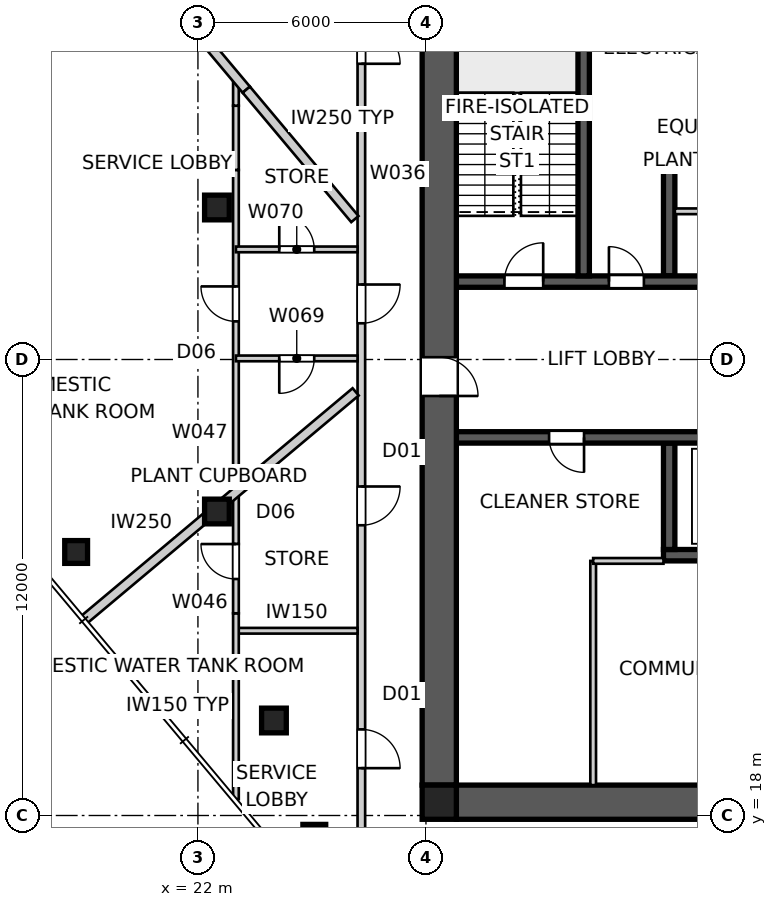
"""IFC4 building model, lengths in metres.
Left out: names, types, materials, properties, quantities, classifications, styles, units other than length and angle.
Written with IfcOpenShell. Run it as: python <this file> out.ifc"""

import sys

from ifc_helpers import new_model, si_unit, direction, frame, frame_2d, origin, origin_2d, place, context, subcontext, project, spatial, polyline, rectangle, outline, extrude, element, fill, save


model = new_model("IFC4")
c1 = context("Model", 3, precision=1e-05, world=origin(), true_north=direction((0.0, 1.0)))
c2 = subcontext(c1, "Body", "Model", "MODEL_VIEW")
j1 = project(units=[si_unit("LENGTHUNIT", "METRE"), si_unit("PLANEANGLEUNIT", "RADIAN")], contexts=[c1])
p1 = place(None, origin())
s1 = spatial("IfcSite", under=j1, at=p1, CompositionType="ELEMENT")
p2 = place(p1, origin())
s2 = spatial("IfcBuilding", under=s1, at=p2, CompositionType="ELEMENT")
p3 = place(p2, frame((0.0, 0.0, 299.8)))
s3 = spatial("IfcBuildingStorey", under=s2, at=p3, CompositionType="ELEMENT", Elevation=299.8)
p4 = place(p3, frame((51.2, 18.35, 0.0), z_axis=(0.0, 0.0, 1.0), x_axis=(-1.0, 0.0, 0.0)))
e1 = element("IfcWall", 1, at=p4, inside=s3, PredefinedType="SHEAR", context=c2, shape_type="SweptSolid", body=[
    extrude(outline(polyline([(0.0, -0.45), (22.4, -0.45), (22.4, -0.025), (22.85, -0.025), (22.85, 0.025), (22.4, 0.025), (22.4, 0.45), (0.0, 0.45), (0.0, 0.025), (-0.45, 0.025), (-0.45, -0.025), (0.0, -0.025), (0.0, -0.45)])), origin(), (0.0, 0.0, 1.0), 4.5),
])
p5 = place(p3, frame((28.35, 41.2, 0.0), z_axis=(0.0, 0.0, 1.0), x_axis=(0.0, -1.0, 0.0)))
e2 = element("IfcWall", 2, at=p5, inside=s3, PredefinedType="SHEAR", context=c2, shape_type="SweptSolid", body=[
    extrude(outline(polyline([(0.0, -0.45), (22.4, -0.45), (22.4, -0.025), (22.85, -0.025), (22.85, 0.025), (22.4, 0.025), (22.4, 0.45), (0.0, 0.45), (0.0, 0.025), (-0.45, 0.025), (-0.45, -0.025), (0.0, -0.025), (0.0, -0.45)])), origin(), (0.0, 0.0, 1.0), 4.5),
])
p6 = place(p5, frame((11.14, 0.0, 0.0)))
e3 = element("IfcOpeningElement", 3, at=p6, cuts=e2, PredefinedType="OPENING", context=c2, shape_type="SweptSolid", body=[
    extrude(rectangle(XDim=1.02, YDim=2.4, at=frame_2d((0.51, 1.2))), frame((0.0, 0.46, 0.0), z_axis=(0.0, -1.0, 0.0), x_axis=(1.0, 0.0, 0.0)), (0.0, 0.0, 1.0), 0.92),
])
p7 = place(p3, frame((28.8, 32.05, 0.0), z_axis=(0.0, 0.0, 1.0), x_axis=(1.0, 0.0, 0.0)))
e4 = element("IfcWall", 4, at=p7, inside=s3, PredefinedType="SHEAR", context=c2, shape_type="SweptSolid", body=[
    extrude(rectangle(XDim=22.4, YDim=0.3, at=frame_2d((11.2, 0.0))), origin(), (0.0, 0.0, 1.0), 4.5),
])
p8 = place(p7, frame((19.04, 0.0, 0.0)))
e5 = element("IfcOpeningElement", 5, at=p8, cuts=e4, PredefinedType="OPENING", context=c2, shape_type="SweptSolid", body=[
    extrude(rectangle(XDim=0.92, YDim=2.1, at=frame_2d((0.46, 1.05))), frame((0.0, 0.16, 0.0), z_axis=(0.0, -1.0, 0.0), x_axis=(1.0, 0.0, 0.0)), (0.0, 0.0, 1.0), 0.32),
])
p9 = place(p7, frame((1.265, 0.0, 0.0)))
e6 = element("IfcOpeningElement", 6, at=p9, cuts=e4, PredefinedType="OPENING", context=c2, shape_type="SweptSolid", body=[
    extrude(rectangle(XDim=1.02, YDim=2.1, at=frame_2d((0.51, 1.05))), frame((0.0, 0.16, 0.0), z_axis=(0.0, -1.0, 0.0), x_axis=(1.0, 0.0, 0.0)), (0.0, 0.0, 1.0), 0.32),
])
p10 = place(p7, frame((4.015, 0.0, 0.0)))
e7 = element("IfcOpeningElement", 7, at=p10, cuts=e4, PredefinedType="OPENING", context=c2, shape_type="SweptSolid", body=[
    extrude(rectangle(XDim=0.92, YDim=2.1, at=frame_2d((0.46, 1.05))), frame((0.0, 0.16, 0.0), z_axis=(0.0, -1.0, 0.0), x_axis=(1.0, 0.0, 0.0)), (0.0, 0.0, 1.0), 0.32),
])
p11 = place(p7, frame((7.015, 0.0, 0.0)))
e8 = element("IfcOpeningElement", 8, at=p11, cuts=e4, PredefinedType="OPENING", context=c2, shape_type="SweptSolid", body=[
    extrude(rectangle(XDim=0.92, YDim=2.1, at=frame_2d((0.46, 1.05))), frame((0.0, 0.16, 0.0), z_axis=(0.0, -1.0, 0.0), x_axis=(1.0, 0.0, 0.0)), (0.0, 0.0, 1.0), 0.32),
])
p12 = place(p7, frame((9.34, 0.0, 0.0)))
e9 = element("IfcOpeningElement", 9, at=p12, cuts=e4, PredefinedType="OPENING", context=c2, shape_type="SweptSolid", body=[
    extrude(rectangle(XDim=0.92, YDim=2.1, at=frame_2d((0.46, 1.05))), frame((0.0, 0.16, 0.0), z_axis=(0.0, -1.0, 0.0), x_axis=(1.0, 0.0, 0.0)), (0.0, 0.0, 1.0), 0.32),
])
p13 = place(p7, frame((14.85, 0.0, 0.0)))
e10 = element("IfcOpeningElement", 10, at=p13, cuts=e4, PredefinedType="OPENING", context=c2, shape_type="SweptSolid", body=[
    extrude(rectangle(XDim=1.1, YDim=2.1, at=frame_2d((0.55, 1.05))), frame((0.0, 0.16, 0.0), z_axis=(0.0, -1.0, 0.0), x_axis=(1.0, 0.0, 0.0)), (0.0, 0.0, 1.0), 0.32),
])
p14 = place(p3, frame((51.2, 27.95, 0.0), z_axis=(0.0, 0.0, 1.0), x_axis=(-1.0, 0.0, 0.0)))
e11 = element("IfcWall", 11, at=p14, inside=s3, PredefinedType="SHEAR", context=c2, shape_type="SweptSolid", body=[
    extrude(rectangle(XDim=22.4, YDim=0.3, at=frame_2d((11.2, 0.0))), origin(), (0.0, 0.0, 1.0), 4.5),
])
p15 = place(p14, frame((19.04, 0.0, 0.0)))
e12 = element("IfcOpeningElement", 12, at=p15, cuts=e11, PredefinedType="OPENING", context=c2, shape_type="SweptSolid", body=[
    extrude(rectangle(XDim=0.92, YDim=2.1, at=frame_2d((0.46, 1.05))), frame((0.0, 0.16, 0.0), z_axis=(0.0, -1.0, 0.0), x_axis=(1.0, 0.0, 0.0)), (0.0, 0.0, 1.0), 0.32),
])
p16 = place(p14, frame((1.265, 0.0, 0.0)))
e13 = element("IfcOpeningElement", 13, at=p16, cuts=e11, PredefinedType="OPENING", context=c2, shape_type="SweptSolid", body=[
    extrude(rectangle(XDim=1.02, YDim=2.1, at=frame_2d((0.51, 1.05))), frame((0.0, 0.16, 0.0), z_axis=(0.0, -1.0, 0.0), x_axis=(1.0, 0.0, 0.0)), (0.0, 0.0, 1.0), 0.32),
])
p17 = place(p14, frame((4.015, 0.0, 0.0)))
e14 = element("IfcOpeningElement", 14, at=p17, cuts=e11, PredefinedType="OPENING", context=c2, shape_type="SweptSolid", body=[
    extrude(rectangle(XDim=0.92, YDim=2.1, at=frame_2d((0.46, 1.05))), frame((0.0, 0.16, 0.0), z_axis=(0.0, -1.0, 0.0), x_axis=(1.0, 0.0, 0.0)), (0.0, 0.0, 1.0), 0.32),
])
p18 = place(p14, frame((9.79, 0.0, 0.0)))
e15 = element("IfcOpeningElement", 15, at=p18, cuts=e11, PredefinedType="OPENING", context=c2, shape_type="SweptSolid", body=[
    extrude(rectangle(XDim=0.92, YDim=2.1, at=frame_2d((0.46, 1.05))), frame((0.0, 0.16, 0.0), z_axis=(0.0, -1.0, 0.0), x_axis=(1.0, 0.0, 0.0)), (0.0, 0.0, 1.0), 0.32),
])
p19 = place(p14, frame((6.115, 0.0, 0.0)))
e16 = element("IfcOpeningElement", 16, at=p19, cuts=e11, PredefinedType="OPENING", context=c2, shape_type="SweptSolid", body=[
    extrude(rectangle(XDim=0.92, YDim=2.1, at=frame_2d((0.46, 1.05))), frame((0.0, 0.16, 0.0), z_axis=(0.0, -1.0, 0.0), x_axis=(1.0, 0.0, 0.0)), (0.0, 0.0, 1.0), 0.32),
])
p20 = place(p14, frame((14.85, 0.0, 0.0)))
e17 = element("IfcOpeningElement", 17, at=p20, cuts=e11, PredefinedType="OPENING", context=c2, shape_type="SweptSolid", body=[
    extrude(rectangle(XDim=1.1, YDim=2.1, at=frame_2d((0.55, 1.05))), frame((0.0, 0.16, 0.0), z_axis=(0.0, -1.0, 0.0), x_axis=(1.0, 0.0, 0.0)), (0.0, 0.0, 1.0), 0.32),
])
for number, where, z_axis, x_axis in (
    (18, (34.25, 35.15, 0.0), (0.0, 0.0, 1.0), (1.0, 0.0, 0.0)),
    (19, (45.75, 24.85, 0.0), (0.0, 0.0, 1.0), (-1.0, 0.0, 0.0)),
):
    element("IfcWall", number, at=place(p3, frame(where, z_axis=z_axis, x_axis=x_axis)), inside=s3, PredefinedType="SHEAR", context=c2, shape_type="SweptSolid", body=[
        extrude(rectangle(XDim=11.5, YDim=0.3, at=frame_2d((5.75, 0.0))), origin(), (0.0, 0.0, 1.0), 4.5),
    ])
for number, where, z_axis, x_axis in (
    (20, (34.4, 32.2, 0.0), (0.0, 0.0, 1.0), (0.0, 1.0, 0.0)),
    (21, (34.4, 27.8, 0.0), (0.0, 0.0, 1.0), (0.0, -1.0, 0.0)),
):
    element("IfcWall", number, at=place(p3, frame(where, z_axis=z_axis, x_axis=x_axis)), inside=s3, PredefinedType="SHEAR", context=c2, shape_type="SweptSolid", body=[
        extrude(rectangle(XDim=2.8, YDim=0.3, at=frame_2d((1.4, 0.0))), origin(), (0.0, 0.0, 1.0), 4.5),
    ])
p21 = place(p3, frame((32.15, 32.2, 0.0), z_axis=(0.0, 0.0, 1.0), x_axis=(0.0, 1.0, 0.0)))
e22 = element("IfcWall", 22, at=p21, inside=s3, PredefinedType="SHEAR", context=c2, shape_type="SweptSolid", body=[
    extrude(rectangle(XDim=7.7, YDim=0.3, at=frame_2d((3.85, 0.0))), origin(), (0.0, 0.0, 1.0), 4.5),
])
p22 = place(p3, frame((28.35, 18.35, 0.0), z_axis=(0.0, 0.0, 1.0), x_axis=(1.0, 0.0, 0.0)))
e23 = element("IfcColumn", 23, at=p22, inside=s3, PredefinedType="COLUMN", context=c2, shape_type="SweptSolid", body=[
    extrude(rectangle(XDim=0.9, YDim=0.9, at=origin_2d()), origin(), (0.0, 0.0, 1.0), 4.5),
])
for number, where, z_axis, x_axis in (
    (24, (18.795, 24.935, 0.0), (0.0, 0.0, 1.0), (1.0, 0.0, 0.0)),
    (25, (25.062, 17.466, 0.0), (0.0, 0.0, 1.0), (1.0, 0.0, 0.0)),
):
    element("IfcColumn", number, at=place(p3, frame(where, z_axis=z_axis, x_axis=x_axis)), inside=s3, PredefinedType="COLUMN", context=c2, shape_type="SweptSolid", body=[
        extrude(rectangle(XDim=0.6, YDim=0.6, at=origin_2d()), origin(), (0.0, 0.0, 1.0), 4.5),
    ])
for number, where, z_axis, x_axis in (
    (26, (22.5, 34.0, 0.0), (0.0, 0.0, 1.0), (1.0, 0.0, 0.0)),
    (27, (22.5, 26.0, 0.0), (0.0, 0.0, 1.0), (1.0, 0.0, 0.0)),
    (28, (24.0, 20.5, 0.0), (0.0, 0.0, 1.0), (1.0, 0.0, 0.0)),
):
    element("IfcColumn", number, at=place(p3, frame(where, z_axis=z_axis, x_axis=x_axis)), inside=s3, PredefinedType="COLUMN", context=c2, shape_type="SweptSolid", body=[
        extrude(rectangle(XDim=0.65, YDim=0.65, at=origin_2d()), origin(), (0.0, 0.0, 1.0), 4.5),
    ])
p23 = place(p3, frame((26.3, 43.7, 0.0), z_axis=(0.0, 0.0, 1.0), x_axis=(0.0, -1.0, 0.0)))
e29 = element("IfcWall", 29, at=p23, inside=s3, PredefinedType="PARTITIONING", context=c2, shape_type="SweptSolid", body=[
    extrude(rectangle(XDim=27.4, YDim=0.2, at=frame_2d((13.7, 0.0))), origin(), (0.0, 0.0, 1.0), 4.3),
])
p24 = place(p23, frame((4.898, 0.0, 0.0)))
e30 = element("IfcOpeningElement", 30, at=p24, cuts=e29, PredefinedType="OPENING", context=c2, shape_type="SweptSolid", body=[
    extrude(rectangle(XDim=1.02, YDim=2.34, at=frame_2d((0.51, 1.17))), frame((0.0, 0.11, 0.0), z_axis=(0.0, -1.0, 0.0), x_axis=(1.0, 0.0, 0.0)), (0.0, 0.0, 1.0), 0.22),
])
p25 = place(p23, frame((17.042, 0.0, 0.0)))
e31 = element("IfcOpeningElement", 31, at=p25, cuts=e29, PredefinedType="OPENING", context=c2, shape_type="SweptSolid", body=[
    extrude(rectangle(XDim=1.02, YDim=2.34, at=frame_2d((0.51, 1.17))), frame((0.0, 0.11, 0.0), z_axis=(0.0, -1.0, 0.0), x_axis=(1.0, 0.0, 0.0)), (0.0, 0.0, 1.0), 0.22),
])
p26 = place(p23, frame((23.434, 0.0, 0.0)))
e32 = element("IfcOpeningElement", 32, at=p26, cuts=e29, PredefinedType="OPENING", context=c2, shape_type="SweptSolid", body=[
    extrude(rectangle(XDim=1.02, YDim=2.34, at=frame_2d((0.51, 1.17))), frame((0.0, 0.11, 0.0), z_axis=(0.0, -1.0, 0.0), x_axis=(1.0, 0.0, 0.0)), (0.0, 0.0, 1.0), 0.22),
])
p27 = place(p23, frame((11.727, 0.0, 0.0)))
e33 = element("IfcOpeningElement", 33, at=p27, cuts=e29, PredefinedType="OPENING", context=c2, shape_type="SweptSolid", body=[
    extrude(rectangle(XDim=1.02, YDim=2.34, at=frame_2d((0.51, 1.17))), frame((0.0, 0.11, 0.0), z_axis=(0.0, -1.0, 0.0), x_axis=(1.0, 0.0, 0.0)), (0.0, 0.0, 1.0), 0.22),
])
p28 = place(p3, frame((21.146, 39.635, 0.0), z_axis=(0.0, 0.0, 1.0), x_axis=(0.642823301165, -0.766014492995, 0.0)))
e34 = element("IfcWall", 34, at=p28, inside=s3, PredefinedType="PARTITIONING", context=c2, shape_type="SweptSolid", body=[
    extrude(rectangle(XDim=3.308, YDim=0.25, at=frame_2d((1.654, 0.0))), origin(), (0.0, 0.0, 1.0), 3.688),
])
p29 = place(p3, frame((23.272, 37.101, 0.0), z_axis=(0.0, 0.0, 1.0), x_axis=(0.642778620996, -0.766051985436, 0.0)))
e35 = element("IfcWall", 35, at=p29, inside=s3, PredefinedType="PARTITIONING", context=c2, shape_type="SweptSolid", body=[
    extrude(rectangle(XDim=4.446, YDim=0.25, at=frame_2d((2.223, 0.0))), origin(), (0.0, 0.0, 1.0), 4.3),
])
p30 = place(p3, frame((18.993, 23.143, 0.0), z_axis=(0.0, 0.0, 1.0), x_axis=(0.766045019392, 0.64278692291, 0.0)))
e36 = element("IfcWall", 36, at=p30, inside=s3, PredefinedType="PARTITIONING", context=c2, shape_type="SweptSolid", body=[
    extrude(rectangle(XDim=9.343, YDim=0.25, at=frame_2d((4.671, 0.0))), origin(), (0.0, 0.0, 1.0), 4.3),
])
p31 = place(p3, frame((32.4, 18.8, 0.0), z_axis=(0.0, 0.0, 1.0), x_axis=(0.0, 1.0, 0.0)))
e37 = element("IfcWall", 37, at=p31, inside=s3, PredefinedType="SOLIDWALL", context=c2, shape_type="SweptSolid", body=[
    extrude(rectangle(XDim=5.9, YDim=0.15, at=frame_2d((2.95, 0.0))), origin(), (0.0, 0.0, 1.0), 4.3),
])
p32 = place(p3, frame((32.4, 24.7, 0.0), z_axis=(0.0, 0.0, 1.0), x_axis=(1.0, 0.0, 0.0)))
e38 = element("IfcWall", 38, at=p32, inside=s3, PredefinedType="SOLIDWALL", context=c2, shape_type="SweptSolid", body=[
    extrude(rectangle(XDim=1.85, YDim=0.15, at=frame_2d((0.925, 0.0))), origin(), (0.0, 0.0, 1.0), 4.3),
])
p33 = place(p3, frame((23.0, 22.862, 0.0), z_axis=(0.0, 0.0, 1.0), x_axis=(1.0, 0.0, 0.0)))
e39 = element("IfcWall", 39, at=p33, inside=s3, PredefinedType="SOLIDWALL", context=c2, shape_type="SweptSolid", body=[
    extrude(rectangle(XDim=3.2, YDim=0.15, at=frame_2d((1.6, 0.0))), origin(), (0.0, 0.0, 1.0), 4.3),
])
p34 = place(p3, frame((23.0, 18.43, 0.0), z_axis=(0.0, 0.0, 1.0), x_axis=(0.0, 1.0, 0.0)))
e40 = element("IfcWall", 40, at=p34, inside=s3, PredefinedType="SOLIDWALL", context=c2, shape_type="SweptSolid", body=[
    extrude(rectangle(XDim=4.892, YDim=0.15, at=frame_2d((2.446, 0.0))), origin(), (0.0, 0.0, 1.0), 4.3),
])
p35 = place(p3, frame((23.0, 23.322, 0.0), z_axis=(0.0, 0.0, 1.0), x_axis=(0.0, 1.0, 0.0)))
e41 = element("IfcWall", 41, at=p35, inside=s3, PredefinedType="SOLIDWALL", context=c2, shape_type="SweptSolid", body=[
    extrude(rectangle(XDim=1.822, YDim=0.15, at=frame_2d((0.911, 0.0))), origin(), (0.0, 0.0, 1.0), 3.3),
])
p36 = place(p35, frame((0.902, 0.0, 0.0)))
e42 = element("IfcOpeningElement", 42, at=p36, cuts=e41, PredefinedType="OPENING", context=c2, shape_type="SweptSolid", body=[
    extrude(rectangle(XDim=0.92, YDim=2.1, at=frame_2d((0.46, 1.05))), frame((0.0, 0.085, 0.0), z_axis=(0.0, -1.0, 0.0), x_axis=(1.0, 0.0, 0.0)), (0.0, 0.0, 1.0), 0.17),
])
p37 = place(p3, frame((23.0, 25.143, 0.0), z_axis=(0.0, 0.0, 1.0), x_axis=(0.0, 1.0, 0.0)))
e43 = element("IfcWall", 43, at=p37, inside=s3, PredefinedType="SOLIDWALL", context=c2, shape_type="SweptSolid", body=[
    extrude(rectangle(XDim=9.845, YDim=0.15, at=frame_2d((4.922, 0.0))), origin(), (0.0, 0.0, 1.0), 4.3),
])
p38 = place(p37, frame((5.86, 0.0, 0.0)))
e44 = element("IfcOpeningElement", 44, at=p38, cuts=e43, PredefinedType="OPENING", context=c2, shape_type="SweptSolid", body=[
    extrude(rectangle(XDim=0.92, YDim=2.1, at=frame_2d((0.46, 1.05))), frame((0.0, 0.085, 0.0), z_axis=(0.0, -1.0, 0.0), x_axis=(1.0, 0.0, 0.0)), (0.0, 0.0, 1.0), 0.17),
])
p39 = place(p3, frame((23.0, 34.988, 0.0), z_axis=(0.0, 0.0, 1.0), x_axis=(0.0, 1.0, 0.0)))
e45 = element("IfcWall", 45, at=p39, inside=s3, PredefinedType="SOLIDWALL", context=c2, shape_type="SweptSolid", body=[
    extrude(rectangle(XDim=1.69, YDim=0.15, at=frame_2d((0.845, 0.0))), origin(), (0.0, 0.0, 1.0), 3.3),
])
p40 = place(p3, frame((23.0, 36.678, 0.0), z_axis=(0.0, 0.0, 1.0), x_axis=(0.0, 1.0, 0.0)))
e46 = element("IfcWall", 46, at=p40, inside=s3, PredefinedType="SOLIDWALL", context=c2, shape_type="SweptSolid", body=[
    extrude(rectangle(XDim=0.747, YDim=0.15, at=frame_2d((0.373, 0.0))), origin(), (0.0, 0.0, 1.0), 4.3),
])
p41 = place(p3, frame((26.2, 30.029, 0.0), z_axis=(0.0, 0.0, 1.0), x_axis=(-1.0, 0.0, 0.0)))
e47 = element("IfcWall", 47, at=p41, inside=s3, PredefinedType="SOLIDWALL", context=c2, shape_type="SweptSolid", body=[
    extrude(rectangle(XDim=3.2, YDim=0.15, at=frame_2d((1.6, 0.0))), origin(), (0.0, 0.0, 1.0), 3.772),
])
p42 = place(p41, frame((1.14, 0.0, 0.0)))
e48 = element("IfcOpeningElement", 48, at=p42, cuts=e47, PredefinedType="OPENING", context=c2, shape_type="SweptSolid", body=[
    extrude(rectangle(XDim=0.92, YDim=2.1, at=frame_2d((0.46, 1.05))), frame((0.0, 0.085, 0.0), z_axis=(0.0, -1.0, 0.0), x_axis=(1.0, 0.0, 0.0)), (0.0, 0.0, 1.0), 0.17),
])
p43 = place(p3, frame((23.0, 32.897, 0.0), z_axis=(0.0, 0.0, 1.0), x_axis=(1.0, 0.0, 0.0)))
e49 = element("IfcWall", 49, at=p43, inside=s3, PredefinedType="SOLIDWALL", context=c2, shape_type="SweptSolid", body=[
    extrude(rectangle(XDim=3.2, YDim=0.15, at=frame_2d((1.6, 0.0))), origin(), (0.0, 0.0, 1.0), 3.772),
])
p44 = place(p43, frame((1.14, 0.0, 0.0)))
e50 = element("IfcOpeningElement", 50, at=p44, cuts=e49, PredefinedType="OPENING", context=c2, shape_type="SweptSolid", body=[
    extrude(rectangle(XDim=0.92, YDim=2.1, at=frame_2d((0.46, 1.05))), frame((0.0, 0.085, 0.0), z_axis=(0.0, -1.0, 0.0), x_axis=(1.0, 0.0, 0.0)), (0.0, 0.0, 1.0), 0.17),
])
p45 = place(p3, frame((34.55, 33.9, 0.0), z_axis=(0.0, 0.0, 1.0), x_axis=(1.0, 0.0, 0.0)))
e51 = element("IfcWall", 51, at=p45, inside=s3, PredefinedType="SOLIDWALL", context=c2, shape_type="SweptSolid", body=[
    extrude(rectangle(XDim=5.35, YDim=0.15, at=frame_2d((2.675, 0.0))), origin(), (0.0, 0.0, 1.0), 4.3),
])
p46 = place(p45, frame((2.215, 0.0, 0.0)))
e52 = element("IfcOpeningElement", 52, at=p46, cuts=e51, PredefinedType="OPENING", context=c2, shape_type="SweptSolid", body=[
    extrude(rectangle(XDim=0.92, YDim=2.1, at=frame_2d((0.46, 1.05))), frame((0.0, 0.085, 0.0), z_axis=(0.0, -1.0, 0.0), x_axis=(1.0, 0.0, 0.0)), (0.0, 0.0, 1.0), 0.17),
])
p47 = place(p15, origin())
e53 = element("IfcDoor", 53, at=p47, inside=s3, OperationType="SINGLE_SWING_LEFT", PredefinedType="DOOR", context=c2, shape_type="SweptSolid", body=[
    extrude(rectangle(XDim=0.92, YDim=2.1, at=frame_2d((0.46, 1.05))), frame((0.0, 0.025, 0.0), z_axis=(0.0, -1.0, 0.0), x_axis=(1.0, 0.0, 0.0)), (0.0, 0.0, 1.0), 0.05),
])
fill(e12, e53)
p48 = place(p9, origin())
e54 = element("IfcDoor", 54, at=p48, inside=s3, OperationType="SINGLE_SWING_RIGHT", PredefinedType="DOOR", context=c2, shape_type="SweptSolid", body=[
    extrude(rectangle(XDim=1.02, YDim=2.1, at=frame_2d((0.51, 1.05))), frame((0.0, 0.025, 0.0), z_axis=(0.0, -1.0, 0.0), x_axis=(1.0, 0.0, 0.0)), (0.0, 0.0, 1.0), 0.05),
])
fill(e6, e54)
p49 = place(p10, origin())
e55 = element("IfcDoor", 55, at=p49, inside=s3, OperationType="SINGLE_SWING_LEFT", PredefinedType="DOOR", context=c2, shape_type="SweptSolid", body=[
    extrude(rectangle(XDim=0.92, YDim=2.1, at=frame_2d((0.46, 1.05))), frame((0.0, 0.025, 0.0), z_axis=(0.0, -1.0, 0.0), x_axis=(1.0, 0.0, 0.0)), (0.0, 0.0, 1.0), 0.05),
])
fill(e7, e55)
p50 = place(p24, origin())
e56 = element("IfcDoor", 56, at=p50, inside=s3, OperationType="SINGLE_SWING_RIGHT", PredefinedType="DOOR", context=c2, shape_type="SweptSolid", body=[
    extrude(rectangle(XDim=1.02, YDim=2.34, at=frame_2d((0.51, 1.17))), frame((0.0, 0.025, 0.0), z_axis=(0.0, -1.0, 0.0), x_axis=(1.0, 0.0, 0.0)), (0.0, 0.0, 1.0), 0.05),
])
fill(e30, e56)
p51 = place(p25, origin())
e57 = element("IfcDoor", 57, at=p51, inside=s3, OperationType="SINGLE_SWING_LEFT", PredefinedType="DOOR", context=c2, shape_type="SweptSolid", body=[
    extrude(rectangle(XDim=1.02, YDim=2.34, at=frame_2d((0.51, 1.17))), frame((0.0, 0.025, 0.0), z_axis=(0.0, -1.0, 0.0), x_axis=(1.0, 0.0, 0.0)), (0.0, 0.0, 1.0), 0.05),
])
fill(e31, e57)
p52 = place(p26, origin())
e58 = element("IfcDoor", 58, at=p52, inside=s3, OperationType="SINGLE_SWING_RIGHT", PredefinedType="DOOR", context=c2, shape_type="SweptSolid", body=[
    extrude(rectangle(XDim=1.02, YDim=2.34, at=frame_2d((0.51, 1.17))), frame((0.0, 0.025, 0.0), z_axis=(0.0, -1.0, 0.0), x_axis=(1.0, 0.0, 0.0)), (0.0, 0.0, 1.0), 0.05),
])
fill(e32, e58)
p53 = place(p27, origin())
e59 = element("IfcDoor", 59, at=p53, inside=s3, OperationType="SINGLE_SWING_LEFT", PredefinedType="DOOR", context=c2, shape_type="SweptSolid", body=[
    extrude(rectangle(XDim=1.02, YDim=2.34, at=frame_2d((0.51, 1.17))), frame((0.0, 0.025, 0.0), z_axis=(0.0, -1.0, 0.0), x_axis=(1.0, 0.0, 0.0)), (0.0, 0.0, 1.0), 0.05),
])
fill(e33, e59)
p54 = place(p36, origin())
e60 = element("IfcDoor", 60, at=p54, inside=s3, OperationType="SINGLE_SWING_RIGHT", PredefinedType="DOOR", context=c2, shape_type="SweptSolid", body=[
    extrude(rectangle(XDim=0.92, YDim=2.1, at=frame_2d((0.46, 1.05))), frame((0.0, 0.025, 0.0), z_axis=(0.0, -1.0, 0.0), x_axis=(1.0, 0.0, 0.0)), (0.0, 0.0, 1.0), 0.05),
])
fill(e42, e60)
p55 = place(p42, origin())
e61 = element("IfcDoor", 61, at=p55, inside=s3, OperationType="SINGLE_SWING_RIGHT", PredefinedType="DOOR", context=c2, shape_type="SweptSolid", body=[
    extrude(rectangle(XDim=0.92, YDim=2.1, at=frame_2d((0.46, 1.05))), frame((0.0, 0.025, 0.0), z_axis=(0.0, -1.0, 0.0), x_axis=(1.0, 0.0, 0.0)), (0.0, 0.0, 1.0), 0.05),
])
fill(e48, e61)
p56 = place(p44, origin())
e62 = element("IfcDoor", 62, at=p56, inside=s3, OperationType="SINGLE_SWING_LEFT", PredefinedType="DOOR", context=c2, shape_type="SweptSolid", body=[
    extrude(rectangle(XDim=0.92, YDim=2.1, at=frame_2d((0.46, 1.05))), frame((0.0, 0.025, 0.0), z_axis=(0.0, -1.0, 0.0), x_axis=(1.0, 0.0, 0.0)), (0.0, 0.0, 1.0), 0.05),
])
fill(e50, e62)
p57 = place(p38, origin())
e63 = element("IfcDoor", 63, at=p57, inside=s3, OperationType="SINGLE_SWING_RIGHT", PredefinedType="DOOR", context=c2, shape_type="SweptSolid", body=[
    extrude(rectangle(XDim=0.92, YDim=2.1, at=frame_2d((0.46, 1.05))), frame((0.0, 0.025, 0.0), z_axis=(0.0, -1.0, 0.0), x_axis=(1.0, 0.0, 0.0)), (0.0, 0.0, 1.0), 0.05),
])
fill(e44, e63)
p58 = place(p6, origin())
e64 = element("IfcDoor", 64, at=p58, inside=s3, OperationType="SINGLE_SWING_RIGHT", PredefinedType="DOOR", context=c2, shape_type="SweptSolid", body=[
    extrude(rectangle(XDim=1.02, YDim=2.4, at=frame_2d((0.51, 1.2))), frame((0.0, 0.025, 0.0), z_axis=(0.0, -1.0, 0.0), x_axis=(1.0, 0.0, 0.0)), (0.0, 0.0, 1.0), 0.05),
])
fill(e3, e64)
save(model, sys.argv[1])
